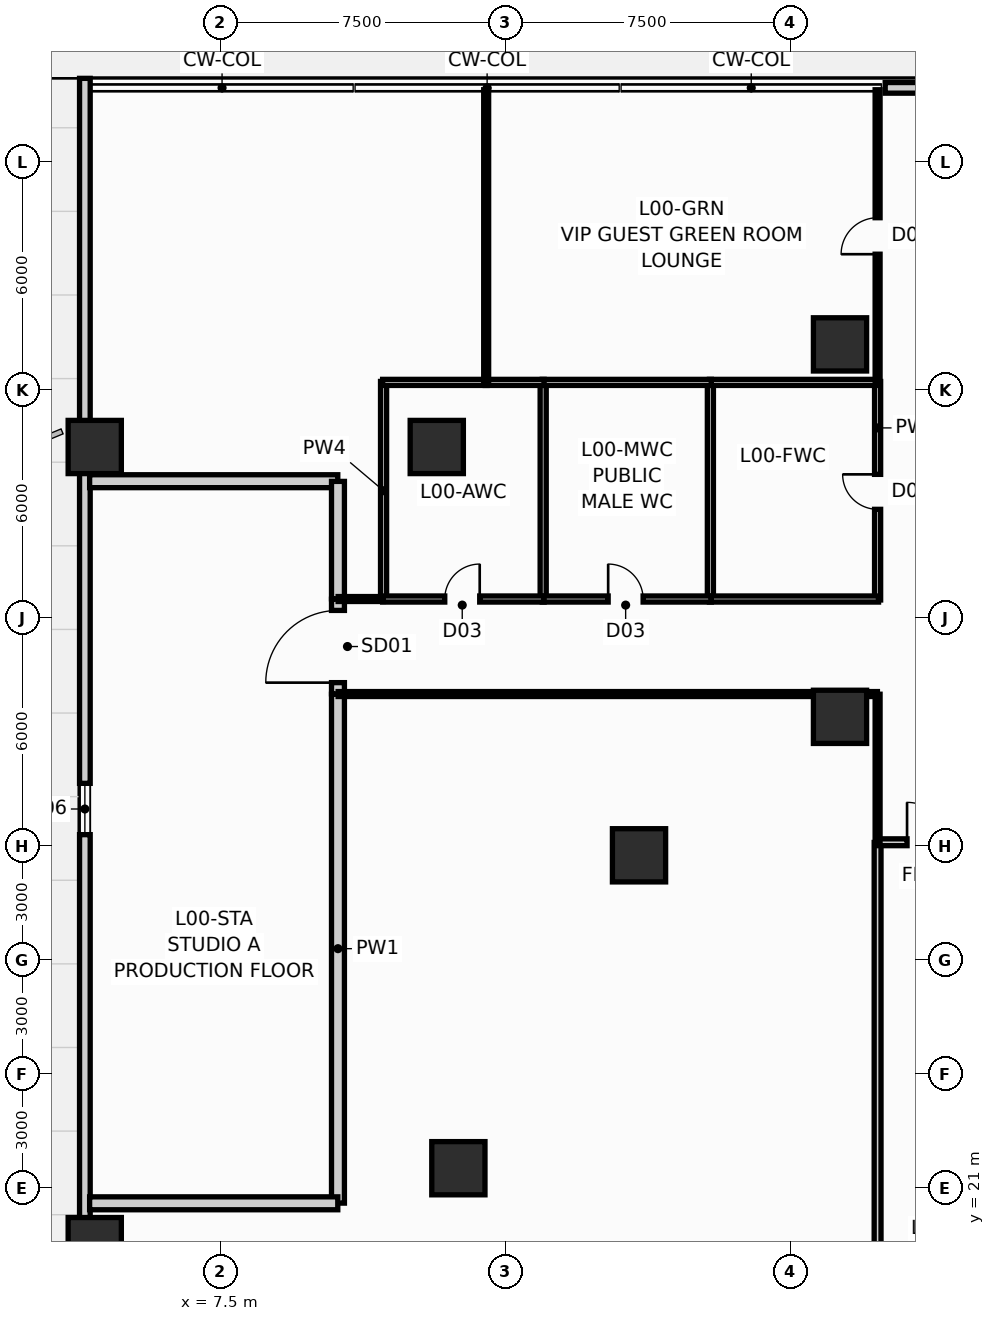
"""IFC4 building model, lengths in metres.
Left out: names, types, materials, properties, quantities, classifications, styles, units other than length and angle.
Written with IfcOpenShell. Run it as: python <this file> out.ifc"""

import sys

from ifc_helpers import new_model, si_unit, direction, frame, frame_2d, origin, origin_2d, place, context, subcontext, project, spatial, rectangle, hollow_rectangle, extrude, source, transform, mapped, element, fill, save


model = new_model("IFC4")
c1 = context("Model", 3, precision=1e-05, world=origin(), true_north=direction((0.0, 1.0)))
c2 = subcontext(c1, "Body", "Model", "MODEL_VIEW")
j1 = project(units=[si_unit("LENGTHUNIT", "METRE"), si_unit("PLANEANGLEUNIT", "RADIAN")], contexts=[c1])
p1 = place(None, origin())
s1 = spatial("IfcSite", under=j1, at=p1, CompositionType="ELEMENT")
p2 = place(p1, origin())
s2 = spatial("IfcBuilding", under=s1, at=p2, CompositionType="ELEMENT")
p3 = place(p2, origin())
s3 = spatial("IfcBuildingStorey", under=s2, at=p3, CompositionType="ELEMENT", Elevation=0.0)
m1 = source(origin(), c2, "Body", "SweptSolid", [
    extrude(hollow_rectangle(XDim=1.4, YDim=1.4, WallThickness=0.08, at=origin_2d()), origin(), (0.0, 0.0, 1.0), 5.401),
])
p4 = place(p3, frame((18.522, 29.757, 0.0), z_axis=(0.014916896444, -0.013786828532, 0.999793683497), x_axis=(0.678742109025, 0.734376708125, 0.0)))
e1 = element("IfcColumn", 1, at=p4, inside=s3, PredefinedType="COLUMN", context=c2, shape_type="MappedRepresentation", body=[
    mapped(m1, transform((0.0, 0.0, 0.0), scale=1.0)),
])
m2 = source(origin(), c2, "Body", "SweptSolid", [
    extrude(hollow_rectangle(XDim=1.4, YDim=1.4, WallThickness=0.08, at=origin_2d()), origin(), (0.0, 0.0, 1.0), 5.401),
])
p5 = place(p3, frame((13.769, 21.523, 0.0), z_axis=(0.010395791054, -0.021559966664, 0.999713506644), x_axis=(0.900755489191, 0.434326546151, 0.0)))
e2 = element("IfcColumn", 2, at=p5, inside=s3, PredefinedType="COLUMN", context=c2, shape_type="MappedRepresentation", body=[
    mapped(m2, transform((0.0, 0.0, 0.0), scale=1.0)),
])
m3 = source(origin(), c2, "Body", "SweptSolid", [
    extrude(hollow_rectangle(XDim=1.4, YDim=1.4, WallThickness=0.08, at=origin_2d()), origin(), (0.0, 0.0, 1.0), 5.4),
])
for number, where, z_axis, x_axis in (
    (3, (23.811, 33.4, 0.0), (0.0, 0.0, 1.0), (1.0, 0.0, 0.0)),
    (4, (23.811, 43.2, 0.0), (0.0, 0.0, 1.0), (1.0, 0.0, 0.0)),
    (5, (4.2, 19.526, 0.0), (0.0, 0.0, 1.0), (1.0, 0.0, 0.0)),
    (6, (4.2, 40.5, 0.0), (0.0, 0.0, 1.0), (1.0, 0.0, 0.0)),
    (7, (13.2, 40.5, 0.0), (0.0, 0.0, 1.0), (1.0, 0.0, 0.0)),
):
    element("IfcColumn", number, at=place(p3, frame(where, z_axis=z_axis, x_axis=x_axis)), inside=s3, PredefinedType="COLUMN", context=c2, shape_type="MappedRepresentation", body=[
        mapped(m3, transform((0.0, 0.0, 0.0), scale=1.0)),
    ])
p6 = place(p3, frame((3.94, 3.8, 0.0), z_axis=(0.0, 0.0, 1.0), x_axis=(0.0, 1.0, 0.0)))
e8 = element("IfcWall", 8, at=p6, inside=s3, PredefinedType="STANDARD", context=c2, shape_type="SweptSolid", body=[
    extrude(rectangle(XDim=46.4, YDim=0.28, at=frame_2d((23.2, 0.0))), origin(), (0.0, 0.0, 1.0), 4.065),
])
p7 = place(p6, frame((6.0, 0.0, 1.05)))
e9 = element("IfcOpeningElement", 9, at=p7, cuts=e8, PredefinedType="OPENING", context=c2, shape_type="SweptSolid", body=[
    extrude(rectangle(XDim=2.4, YDim=1.95, at=frame_2d((1.2, 0.975))), frame((0.0, 0.152, 0.0), z_axis=(0.0, -1.0, 0.0), x_axis=(1.0, 0.0, 0.0)), (0.0, 0.0, 1.0), 0.304),
])
p8 = place(p6, frame((26.5, 0.0, 1.2)))
e10 = element("IfcOpeningElement", 10, at=p8, cuts=e8, PredefinedType="OPENING", context=c2, shape_type="SweptSolid", body=[
    extrude(rectangle(XDim=1.35, YDim=1.5, at=frame_2d((0.675, 0.75))), frame((0.0, 0.152, 0.0), z_axis=(0.0, -1.0, 0.0), x_axis=(1.0, 0.0, 0.0)), (0.0, 0.0, 1.0), 0.304),
])
p9 = place(p3, frame((25.0, 49.95, 0.0), z_axis=(0.0, 0.0, 1.0), x_axis=(1.0, 0.0, 0.0)))
e11 = element("IfcWall", 11, at=p9, inside=s3, PredefinedType="STANDARD", context=c2, shape_type="SweptSolid", body=[
    extrude(rectangle(XDim=26.0, YDim=0.28, at=frame_2d((13.0, 0.0))), origin(), (0.0, 0.0, 1.0), 5.08),
])
p10 = place(p9, frame((14.9, 0.0, 0.0)))
e12 = element("IfcOpeningElement", 12, at=p10, cuts=e11, PredefinedType="OPENING", context=c2, shape_type="SweptSolid", body=[
    extrude(rectangle(XDim=2.0, YDim=2.4, at=frame_2d((1.0, 1.2))), frame((0.0, 0.152, 0.0), z_axis=(0.0, -1.0, 0.0), x_axis=(1.0, 0.0, 0.0)), (0.0, 0.0, 1.0), 0.304),
])
p11 = place(p9, frame((11.6, 0.0, 0.0)))
e13 = element("IfcOpeningElement", 13, at=p11, cuts=e11, PredefinedType="OPENING", context=c2, shape_type="SweptSolid", body=[
    extrude(rectangle(XDim=1.8, YDim=2.3, at=frame_2d((0.9, 1.15))), frame((0.0, 0.152, 0.0), z_axis=(0.0, -1.0, 0.0), x_axis=(1.0, 0.0, 0.0)), (0.0, 0.0, 1.0), 0.304),
])
p12 = place(p9, frame((1.1, 0.0, 0.0)))
e14 = element("IfcOpeningElement", 14, at=p12, cuts=e11, PredefinedType="OPENING", context=c2, shape_type="SweptSolid", body=[
    extrude(rectangle(XDim=2.0, YDim=2.4, at=frame_2d((1.0, 1.2))), frame((0.0, 0.152, 0.0), z_axis=(0.0, -1.0, 0.0), x_axis=(1.0, 0.0, 0.0)), (0.0, 0.0, 1.0), 0.304),
])
p13 = place(p9, frame((4.6, 0.0, 0.0)))
e15 = element("IfcOpeningElement", 15, at=p13, cuts=e11, PredefinedType="OPENING", context=c2, shape_type="SweptSolid", body=[
    extrude(rectangle(XDim=2.0, YDim=2.4, at=frame_2d((1.0, 1.2))), frame((0.0, 0.152, 0.0), z_axis=(0.0, -1.0, 0.0), x_axis=(1.0, 0.0, 0.0)), (0.0, 0.0, 1.0), 0.304),
])
p14 = place(p9, frame((8.1, 0.0, 0.0)))
e16 = element("IfcOpeningElement", 16, at=p14, cuts=e11, PredefinedType="OPENING", context=c2, shape_type="SweptSolid", body=[
    extrude(rectangle(XDim=2.0, YDim=2.4, at=frame_2d((1.0, 1.2))), frame((0.0, 0.152, 0.0), z_axis=(0.0, -1.0, 0.0), x_axis=(1.0, 0.0, 0.0)), (0.0, 0.0, 1.0), 0.304),
])
p15 = place(p9, frame((18.4, 0.0, 0.0)))
e17 = element("IfcOpeningElement", 17, at=p15, cuts=e11, PredefinedType="OPENING", context=c2, shape_type="SweptSolid", body=[
    extrude(rectangle(XDim=2.0, YDim=2.4, at=frame_2d((1.0, 1.2))), frame((0.0, 0.152, 0.0), z_axis=(0.0, -1.0, 0.0), x_axis=(1.0, 0.0, 0.0)), (0.0, 0.0, 1.0), 0.304),
])
p16 = place(p9, frame((21.9, 0.0, 0.0)))
e18 = element("IfcOpeningElement", 18, at=p16, cuts=e11, PredefinedType="OPENING", context=c2, shape_type="SweptSolid", body=[
    extrude(rectangle(XDim=2.0, YDim=2.4, at=frame_2d((1.0, 1.2))), frame((0.0, 0.152, 0.0), z_axis=(0.0, -1.0, 0.0), x_axis=(1.0, 0.0, 0.0)), (0.0, 0.0, 1.0), 0.304),
])
p17 = place(p3, frame((24.8, 36.475, 0.0), z_axis=(0.0, 0.0, 1.0), x_axis=(0.0, 1.0, 0.0)))
e19 = element("IfcWall", 19, at=p17, inside=s3, PredefinedType="PLUMBINGWALL", context=c2, shape_type="SweptSolid", body=[
    extrude(rectangle(XDim=5.75, YDim=0.16, at=frame_2d((2.875, 0.0))), origin(), (0.0, 0.0, 1.0), 5.08),
])
p18 = place(p17, frame((2.385, 0.0, 0.0)))
e20 = element("IfcOpeningElement", 20, at=p18, cuts=e19, PredefinedType="OPENING", context=c2, shape_type="SweptSolid", body=[
    extrude(rectangle(XDim=0.92, YDim=2.1, at=frame_2d((0.46, 1.05))), frame((0.0, 0.092, 0.0), z_axis=(0.0, -1.0, 0.0), x_axis=(1.0, 0.0, 0.0)), (0.0, 0.0, 1.0), 0.184),
])
for number, where, z_axis, x_axis in (
    (21, (11.8, 36.475, 0.0), (0.0, 0.0, 1.0), (0.0, 1.0, 0.0)),
    (22, (16.0, 36.475, 0.0), (0.0, 0.0, 1.0), (0.0, 1.0, 0.0)),
    (23, (20.4, 36.475, 0.0), (0.0, 0.0, 1.0), (0.0, 1.0, 0.0)),
):
    element("IfcWall", number, at=place(p3, frame(where, z_axis=z_axis, x_axis=x_axis)), inside=s3, PredefinedType="PLUMBINGWALL", context=c2, shape_type="SweptSolid", body=[
        extrude(rectangle(XDim=5.75, YDim=0.16, at=frame_2d((2.875, 0.0))), origin(), (0.0, 0.0, 1.0), 5.08),
    ])
for number, where, z_axis, x_axis in (
    (24, (20.375, 36.5, 0.0), (0.0, 0.0, 1.0), (1.0, 0.0, 0.0)),
    (25, (20.375, 42.2, 0.0), (0.0, 0.0, 1.0), (1.0, 0.0, 0.0)),
):
    element("IfcWall", number, at=place(p3, frame(where, z_axis=z_axis, x_axis=x_axis)), inside=s3, PredefinedType="PLUMBINGWALL", context=c2, shape_type="SweptSolid", body=[
        extrude(rectangle(XDim=4.45, YDim=0.16, at=frame_2d((2.225, 0.0))), origin(), (0.0, 0.0, 1.0), 5.08),
    ])
p19 = place(p3, frame((15.975, 36.5, 0.0), z_axis=(0.0, 0.0, 1.0), x_axis=(1.0, 0.0, 0.0)))
e26 = element("IfcWall", 26, at=p19, inside=s3, PredefinedType="PLUMBINGWALL", context=c2, shape_type="SweptSolid", body=[
    extrude(rectangle(XDim=4.45, YDim=0.16, at=frame_2d((2.225, 0.0))), origin(), (0.0, 0.0, 1.0), 5.08),
])
p20 = place(p19, frame((1.735, 0.0, 0.0)))
e27 = element("IfcOpeningElement", 27, at=p20, cuts=e26, PredefinedType="OPENING", context=c2, shape_type="SweptSolid", body=[
    extrude(rectangle(XDim=0.92, YDim=2.1, at=frame_2d((0.46, 1.05))), frame((0.0, 0.092, 0.0), z_axis=(0.0, -1.0, 0.0), x_axis=(1.0, 0.0, 0.0)), (0.0, 0.0, 1.0), 0.184),
])
p21 = place(p3, frame((15.975, 42.2, 0.0), z_axis=(0.0, 0.0, 1.0), x_axis=(1.0, 0.0, 0.0)))
e28 = element("IfcWall", 28, at=p21, inside=s3, PredefinedType="PLUMBINGWALL", context=c2, shape_type="SweptSolid", body=[
    extrude(rectangle(XDim=4.45, YDim=0.16, at=frame_2d((2.225, 0.0))), origin(), (0.0, 0.0, 1.0), 5.08),
])
p22 = place(p3, frame((11.775, 36.5, 0.0), z_axis=(0.0, 0.0, 1.0), x_axis=(1.0, 0.0, 0.0)))
e29 = element("IfcWall", 29, at=p22, inside=s3, PredefinedType="PLUMBINGWALL", context=c2, shape_type="SweptSolid", body=[
    extrude(rectangle(XDim=4.25, YDim=0.16, at=frame_2d((2.125, 0.0))), origin(), (0.0, 0.0, 1.0), 5.08),
])
p23 = place(p22, frame((1.635, 0.0, 0.0)))
e30 = element("IfcOpeningElement", 30, at=p23, cuts=e29, PredefinedType="OPENING", context=c2, shape_type="SweptSolid", body=[
    extrude(rectangle(XDim=0.92, YDim=2.1, at=frame_2d((0.46, 1.05))), frame((0.0, 0.092, 0.0), z_axis=(0.0, -1.0, 0.0), x_axis=(1.0, 0.0, 0.0)), (0.0, 0.0, 1.0), 0.184),
])
p24 = place(p3, frame((11.775, 42.2, 0.0), z_axis=(0.0, 0.0, 1.0), x_axis=(1.0, 0.0, 0.0)))
e31 = element("IfcWall", 31, at=p24, inside=s3, PredefinedType="PLUMBINGWALL", context=c2, shape_type="SweptSolid", body=[
    extrude(rectangle(XDim=2.75, YDim=0.16, at=frame_2d((1.375, 0.0))), origin(), (0.0, 0.0, 1.0), 5.08),
])
p25 = place(p3, frame((14.475, 42.2, 0.0), z_axis=(0.0, 0.0, 1.0), x_axis=(1.0, 0.0, 0.0)))
e32 = element("IfcWall", 32, at=p25, inside=s3, PredefinedType="PLUMBINGWALL", context=c2, shape_type="SweptSolid", body=[
    extrude(rectangle(XDim=1.55, YDim=0.16, at=frame_2d((0.775, 0.0))), origin(), (0.0, 0.0, 1.0), 5.08),
])
p26 = place(p3, frame((10.6, 33.995, 0.0), z_axis=(0.0, 0.0, 1.0), x_axis=(0.0, -1.0, 0.0)))
e33 = element("IfcWall", 33, at=p26, inside=s3, PredefinedType="PARTITIONING", context=c2, shape_type="SweptSolid", body=[
    extrude(rectangle(XDim=13.39, YDim=0.34, at=frame_2d((6.695, 0.0))), origin(), (0.0, 0.0, 1.0), 5.08),
])
p27 = place(p3, frame((10.595, 20.6, 0.0), z_axis=(0.0, 0.0, 1.0), x_axis=(-1.0, 0.0, 0.0)))
e34 = element("IfcWall", 34, at=p27, inside=s3, PredefinedType="PARTITIONING", context=c2, shape_type="SweptSolid", body=[
    extrude(rectangle(XDim=6.53, YDim=0.34, at=frame_2d((3.265, 0.0))), origin(), (0.0, 0.0, 1.0), 4.065),
])
p28 = place(p3, frame((4.065, 39.6, 0.0), z_axis=(0.0, 0.0, 1.0), x_axis=(1.0, 0.0, 0.0)))
e35 = element("IfcWall", 35, at=p28, inside=s3, PredefinedType="PARTITIONING", context=c2, shape_type="SweptSolid", body=[
    extrude(rectangle(XDim=6.53, YDim=0.34, at=frame_2d((3.265, 0.0))), origin(), (0.0, 0.0, 1.0), 5.08),
])
p29 = place(p3, frame((10.6, 39.595, 0.0), z_axis=(0.0, 0.0, 1.0), x_axis=(0.0, -1.0, 0.0)))
e36 = element("IfcWall", 36, at=p29, inside=s3, PredefinedType="PARTITIONING", context=c2, shape_type="SweptSolid", body=[
    extrude(rectangle(XDim=3.09, YDim=0.34, at=frame_2d((1.545, 0.0))), origin(), (0.0, 0.0, 1.0), 5.08),
])
p30 = place(p3, frame((10.6, 34.005, 0.0), z_axis=(0.0, 0.0, 1.0), x_axis=(0.0, 1.0, 0.0)))
e37 = element("IfcWall", 37, at=p30, inside=s3, PredefinedType="PARTITIONING", context=c2, shape_type="SweptSolid", body=[
    extrude(rectangle(XDim=2.49, YDim=0.34, at=frame_2d((1.245, 0.0))), origin(), (0.0, 0.0, 1.0), 5.08),
])
p31 = place(p30, frame((0.295, 0.0, 0.0)))
e38 = element("IfcOpeningElement", 38, at=p31, cuts=e37, PredefinedType="OPENING", context=c2, shape_type="SweptSolid", body=[
    extrude(rectangle(XDim=1.9, YDim=2.35, at=frame_2d((0.95, 1.175))), frame((0.0, 0.182, 0.0), z_axis=(0.0, -1.0, 0.0), x_axis=(1.0, 0.0, 0.0)), (0.0, 0.0, 1.0), 0.364),
])
p32 = place(p3, frame((24.8, 10.505, 0.0), z_axis=(0.0, 0.0, 1.0), x_axis=(0.0, 1.0, 0.0)))
e39 = element("IfcWall", 39, at=p32, inside=s3, PredefinedType="PARTITIONING", context=c2, shape_type="SweptSolid", body=[
    extrude(rectangle(XDim=19.59, YDim=0.18, at=frame_2d((9.795, 0.0))), origin(), (0.0, 0.0, 1.0), 4.706),
])
p33 = place(p3, frame((24.805, 30.1, 0.0), z_axis=(0.0, 0.0, 1.0), x_axis=(1.0, 0.0, 0.0)))
e40 = element("IfcWall", 40, at=p33, inside=s3, PredefinedType="PARTITIONING", context=c2, shape_type="SweptSolid", body=[
    extrude(rectangle(XDim=2.59, YDim=0.18, at=frame_2d((1.295, 0.0))), origin(), (0.0, 0.0, 1.0), 4.453),
])
p34 = place(p33, frame((0.77, 0.0, 0.0)))
e41 = element("IfcOpeningElement", 41, at=p34, cuts=e40, PredefinedType="OPENING", context=c2, shape_type="SweptSolid", body=[
    extrude(rectangle(XDim=1.05, YDim=2.15, at=frame_2d((0.525, 1.075))), frame((0.0, 0.102, 0.0), z_axis=(0.0, -1.0, 0.0), x_axis=(1.0, 0.0, 0.0)), (0.0, 0.0, 1.0), 0.204),
])
p35 = place(p3, frame((24.795, 34.0, 0.0), z_axis=(0.0, 0.0, 1.0), x_axis=(-1.0, 0.0, 0.0)))
e42 = element("IfcWall", 42, at=p35, inside=s3, PredefinedType="PARTITIONING", context=c2, shape_type="SweptSolid", body=[
    extrude(rectangle(XDim=14.19, YDim=0.13, at=frame_2d((7.095, 0.0))), origin(), (0.0, 0.0, 1.0), 5.08),
])
p36 = place(p3, frame((24.8, 42.205, 0.0), z_axis=(0.0, 0.0, 1.0), x_axis=(0.0, 1.0, 0.0)))
e43 = element("IfcWall", 43, at=p36, inside=s3, PredefinedType="PARTITIONING", context=c2, shape_type="SweptSolid", body=[
    extrude(rectangle(XDim=7.695, YDim=0.13, at=frame_2d((3.847, 0.0))), origin(), (0.0, 0.0, 1.0), 5.08),
])
p37 = place(p36, frame((3.368, 0.0, 0.0)))
e44 = element("IfcOpeningElement", 44, at=p37, cuts=e43, PredefinedType="OPENING", context=c2, shape_type="SweptSolid", body=[
    extrude(rectangle(XDim=0.96, YDim=2.15, at=frame_2d((0.48, 1.075))), frame((0.0, 0.077, 0.0), z_axis=(0.0, -1.0, 0.0), x_axis=(1.0, 0.0, 0.0)), (0.0, 0.0, 1.0), 0.154),
])
p38 = place(p3, frame((14.5, 42.205, 0.0), z_axis=(0.0, 0.0, 1.0), x_axis=(0.0, 1.0, 0.0)))
e45 = element("IfcWall", 45, at=p38, inside=s3, PredefinedType="PARTITIONING", context=c2, shape_type="SweptSolid", body=[
    extrude(rectangle(XDim=7.695, YDim=0.13, at=frame_2d((3.847, 0.0))), origin(), (0.0, 0.0, 1.0), 5.08),
])
p39 = place(p3, frame((24.8, 30.105, 0.0), z_axis=(0.0, 0.0, 1.0), x_axis=(0.0, 1.0, 0.0)))
e46 = element("IfcWall", 46, at=p39, inside=s3, PredefinedType="PARTITIONING", context=c2, shape_type="SweptSolid", body=[
    extrude(rectangle(XDim=3.89, YDim=0.13, at=frame_2d((1.945, 0.0))), origin(), (0.0, 0.0, 1.0), 5.08),
])
p40 = place(p3, frame((10.605, 36.5, 0.0), z_axis=(0.0, 0.0, 1.0), x_axis=(1.0, 0.0, 0.0)))
e47 = element("IfcWall", 47, at=p40, inside=s3, PredefinedType="PARTITIONING", context=c2, shape_type="SweptSolid", body=[
    extrude(rectangle(XDim=1.19, YDim=0.13, at=frame_2d((0.595, 0.0))), origin(), (0.0, 0.0, 1.0), 5.08),
])
p41 = place(p8, origin())
e48 = element("IfcWindow", 48, at=p41, inside=s3, PartitioningType="SINGLE_PANEL", PredefinedType="WINDOW", context=c2, shape_type="SweptSolid", body=[
    extrude(rectangle(XDim=1.35, YDim=1.5, at=frame_2d((0.675, 0.75))), frame((0.0, 0.03, 0.0), z_axis=(0.0, -1.0, 0.0), x_axis=(1.0, 0.0, 0.0)), (0.0, 0.0, 1.0), 0.06),
])
fill(e10, e48)
p42 = place(p18, origin())
e49 = element("IfcDoor", 49, at=p42, inside=s3, OperationType="SINGLE_SWING_RIGHT", PredefinedType="DOOR", context=c2, shape_type="SweptSolid", body=[
    extrude(rectangle(XDim=0.92, YDim=2.1, at=frame_2d((0.46, 1.05))), frame((0.0, 0.025, 0.0), z_axis=(0.0, -1.0, 0.0), x_axis=(1.0, 0.0, 0.0)), (0.0, 0.0, 1.0), 0.05),
])
fill(e20, e49)
p43 = place(p20, origin())
e50 = element("IfcDoor", 50, at=p43, inside=s3, OperationType="SINGLE_SWING_LEFT", PredefinedType="DOOR", context=c2, shape_type="SweptSolid", body=[
    extrude(rectangle(XDim=0.92, YDim=2.1, at=frame_2d((0.46, 1.05))), frame((0.0, 0.025, 0.0), z_axis=(0.0, -1.0, 0.0), x_axis=(1.0, 0.0, 0.0)), (0.0, 0.0, 1.0), 0.05),
])
fill(e27, e50)
p44 = place(p23, origin())
e51 = element("IfcDoor", 51, at=p44, inside=s3, OperationType="SINGLE_SWING_RIGHT", PredefinedType="DOOR", context=c2, shape_type="SweptSolid", body=[
    extrude(rectangle(XDim=0.92, YDim=2.1, at=frame_2d((0.46, 1.05))), frame((0.0, 0.025, 0.0), z_axis=(0.0, -1.0, 0.0), x_axis=(1.0, 0.0, 0.0)), (0.0, 0.0, 1.0), 0.05),
])
fill(e30, e51)
p45 = place(p31, origin())
e52 = element("IfcDoor", 52, at=p45, inside=s3, OperationType="DOUBLE_DOOR_SINGLE_SWING", PredefinedType="DOOR", context=c2, shape_type="SweptSolid", body=[
    extrude(rectangle(XDim=1.9, YDim=2.35, at=frame_2d((0.95, 1.175))), frame((0.0, 0.025, 0.0), z_axis=(0.0, -1.0, 0.0), x_axis=(1.0, 0.0, 0.0)), (0.0, 0.0, 1.0), 0.05),
])
fill(e38, e52)
p46 = place(p34, origin())
e53 = element("IfcDoor", 53, at=p46, inside=s3, OperationType="SINGLE_SWING_LEFT", PredefinedType="DOOR", context=c2, shape_type="SweptSolid", body=[
    extrude(rectangle(XDim=1.05, YDim=2.15, at=frame_2d((0.525, 1.075))), frame((0.0, 0.025, 0.0), z_axis=(0.0, -1.0, 0.0), x_axis=(1.0, 0.0, 0.0)), (0.0, 0.0, 1.0), 0.05),
])
fill(e41, e53)
p47 = place(p37, origin())
e54 = element("IfcDoor", 54, at=p47, inside=s3, OperationType="SINGLE_SWING_LEFT", PredefinedType="DOOR", context=c2, shape_type="SweptSolid", body=[
    extrude(rectangle(XDim=0.96, YDim=2.15, at=frame_2d((0.48, 1.075))), frame((0.0, 0.025, 0.0), z_axis=(0.0, -1.0, 0.0), x_axis=(1.0, 0.0, 0.0)), (0.0, 0.0, 1.0), 0.05),
])
fill(e44, e54)
save(model, sys.argv[1])
